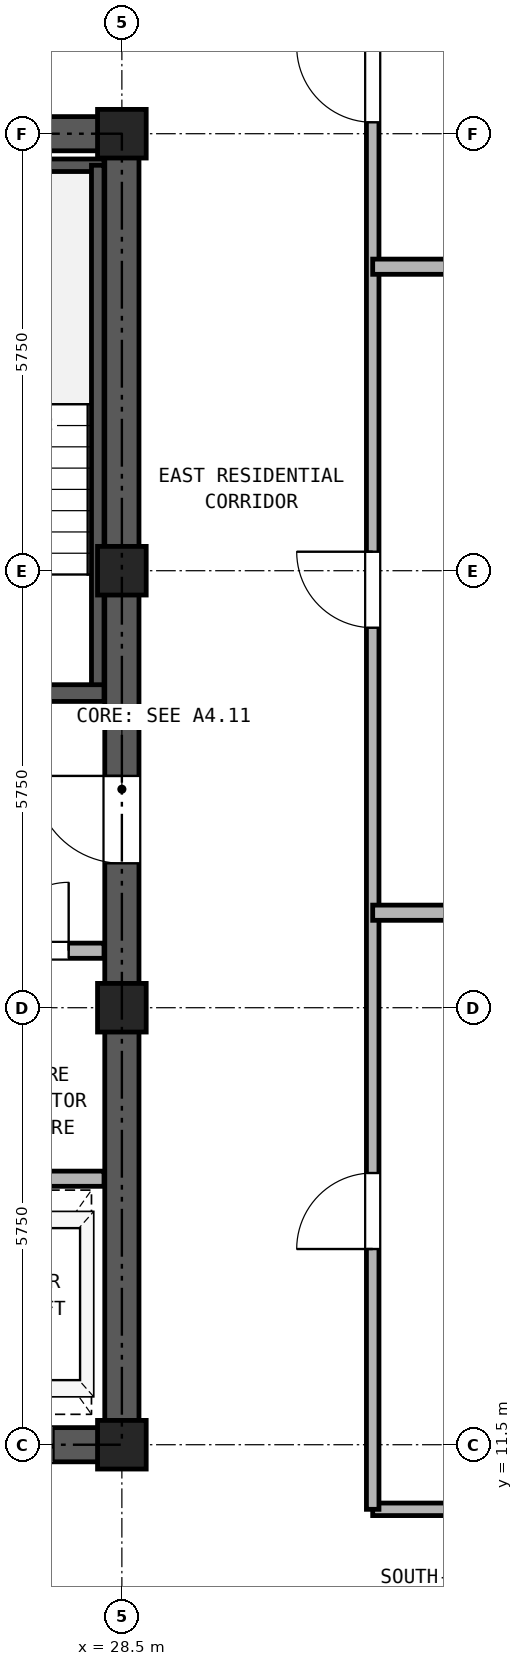
"""IFC4 building model, lengths in metres.
Left out: names, types, materials, properties, quantities, classifications, styles, units other than length and angle.
Written with IfcOpenShell. Run it as: python <this file> out.ifc"""

import sys

from ifc_helpers import new_model, si_unit, direction, frame, frame_2d, origin, origin_2d, place, context, subcontext, project, spatial, rectangle, hollow_rectangle, extrude, source, transform, mapped, element, fill, save


model = new_model("IFC4")
c1 = context("Model", 3, precision=1e-05, world=origin(), true_north=direction((0.0, 1.0)))
c2 = subcontext(c1, "Body", "Model", "MODEL_VIEW")
j1 = project(units=[si_unit("LENGTHUNIT", "METRE"), si_unit("PLANEANGLEUNIT", "RADIAN")], contexts=[c1])
p1 = place(None, origin())
s1 = spatial("IfcSite", under=j1, at=p1, CompositionType="ELEMENT")
p2 = place(p1, origin())
s2 = spatial("IfcBuilding", under=s1, at=p2, CompositionType="ELEMENT")
p3 = place(p2, frame((0.0, 0.0, 162.5)))
s3 = spatial("IfcBuildingStorey", under=s2, at=p3, CompositionType="ELEMENT", Elevation=162.5)
m1 = source(origin(), c2, "Body", "SweptSolid", [
    extrude(hollow_rectangle(XDim=0.64, YDim=0.64, WallThickness=0.035, at=origin_2d()), origin(), (0.0, 0.0, 1.0), 2.95),
])
for number, where, z_axis, x_axis in (
    (1, (28.5, 11.5, 0.0), (0.0, 0.0, 1.0), (1.0, 0.0, 0.0)),
    (2, (28.5, 17.25, 0.0), (0.0, 0.0, 1.0), (1.0, 0.0, 0.0)),
    (3, (28.5, 23.0, 0.0), (0.0, 0.0, 1.0), (1.0, 0.0, 0.0)),
    (4, (28.5, 28.75, 0.0), (0.0, 0.0, 1.0), (1.0, 0.0, 0.0)),
):
    element("IfcColumn", number, at=place(p3, frame(where, z_axis=z_axis, x_axis=x_axis)), inside=s3, PredefinedType="COLUMN", context=c2, shape_type="MappedRepresentation", body=[
        mapped(m1, transform((0.0, 0.0, 0.0), x_axis=(1.0, 0.0, 0.0), y_axis=(0.0, 1.0, 0.0), z_axis=(0.0, 0.0, 1.0), scale=1.0)),
    ])
p4 = place(p3, frame((18.275, 11.5, 0.0), z_axis=(0.0, 0.0, 1.0), x_axis=(1.0, 0.0, 0.0)))
e5 = element("IfcWall", 5, at=p4, inside=s3, PredefinedType="SHEAR", context=c2, shape_type="SweptSolid", body=[
    extrude(rectangle(XDim=10.45, YDim=0.45, at=frame_2d((5.225, 0.0))), origin(), (0.0, 0.0, 1.0), 2.95),
])
p5 = place(p4, frame((1.825, 0.0, 0.0)))
e6 = element("IfcOpeningElement", 6, at=p5, cuts=e5, PredefinedType="OPENING", context=c2, shape_type="SweptSolid", body=[
    extrude(rectangle(XDim=0.95, YDim=2.15, at=frame_2d((0.475, 1.075))), frame((0.0, 0.235, 0.0), z_axis=(0.0, -1.0, 0.0), x_axis=(1.0, 0.0, 0.0)), (0.0, 0.0, 1.0), 0.47),
])
p6 = place(p4, frame((5.325, 0.0, 0.0)))
e7 = element("IfcOpeningElement", 7, at=p6, cuts=e5, PredefinedType="OPENING", context=c2, shape_type="SweptSolid", body=[
    extrude(rectangle(XDim=0.95, YDim=2.15, at=frame_2d((0.475, 1.075))), frame((0.0, 0.235, 0.0), z_axis=(0.0, -1.0, 0.0), x_axis=(1.0, 0.0, 0.0)), (0.0, 0.0, 1.0), 0.47),
])
p7 = place(p4, frame((8.225, 0.0, 0.0)))
e8 = element("IfcOpeningElement", 8, at=p7, cuts=e5, PredefinedType="OPENING", context=c2, shape_type="SweptSolid", body=[
    extrude(rectangle(XDim=1.1, YDim=2.25, at=frame_2d((0.55, 1.125))), frame((0.0, 0.235, 0.0), z_axis=(0.0, -1.0, 0.0), x_axis=(1.0, 0.0, 0.0)), (0.0, 0.0, 1.0), 0.47),
])
p8 = place(p3, frame((18.275, 28.75, 0.0), z_axis=(0.0, 0.0, 1.0), x_axis=(1.0, 0.0, 0.0)))
e9 = element("IfcWall", 9, at=p8, inside=s3, PredefinedType="SHEAR", context=c2, shape_type="SweptSolid", body=[
    extrude(rectangle(XDim=10.45, YDim=0.45, at=frame_2d((5.225, 0.0))), origin(), (0.0, 0.0, 1.0), 2.95),
])
p9 = place(p8, frame((4.105, 0.0, 0.0)))
e10 = element("IfcOpeningElement", 10, at=p9, cuts=e9, PredefinedType="OPENING", context=c2, shape_type="SweptSolid", body=[
    extrude(rectangle(XDim=0.9, YDim=2.05, at=frame_2d((0.45, 1.025))), frame((0.0, 0.235, 0.0), z_axis=(0.0, -1.0, 0.0), x_axis=(1.0, 0.0, 0.0)), (0.0, 0.0, 1.0), 0.47),
])
p10 = place(p8, frame((5.645, 0.0, 0.0)))
e11 = element("IfcOpeningElement", 11, at=p10, cuts=e9, PredefinedType="OPENING", context=c2, shape_type="SweptSolid", body=[
    extrude(rectangle(XDim=0.9, YDim=2.05, at=frame_2d((0.45, 1.025))), frame((0.0, 0.235, 0.0), z_axis=(0.0, -1.0, 0.0), x_axis=(1.0, 0.0, 0.0)), (0.0, 0.0, 1.0), 0.47),
])
p11 = place(p3, frame((28.5, 11.725, 0.0), z_axis=(0.0, 0.0, 1.0), x_axis=(0.0, 1.0, 0.0)))
e12 = element("IfcWall", 12, at=p11, inside=s3, PredefinedType="SHEAR", context=c2, shape_type="SweptSolid", body=[
    extrude(rectangle(XDim=16.8, YDim=0.45, at=frame_2d((8.4, 0.0))), origin(), (0.0, 0.0, 1.0), 2.95),
])
p12 = place(p11, frame((7.425, 0.0, 0.0)))
e13 = element("IfcOpeningElement", 13, at=p12, cuts=e12, PredefinedType="OPENING", context=c2, shape_type="SweptSolid", body=[
    extrude(rectangle(XDim=1.15, YDim=2.2, at=frame_2d((0.575, 1.1))), frame((0.0, 0.235, 0.0), z_axis=(0.0, -1.0, 0.0), x_axis=(1.0, 0.0, 0.0)), (0.0, 0.0, 1.0), 0.47),
])
p13 = place(p3, frame((25.13, 28.335, 0.0), z_axis=(0.0, 0.0, 1.0), x_axis=(1.0, 0.0, 0.0)))
e14 = element("IfcWall", 14, at=p13, inside=s3, PredefinedType="PARTITIONING", context=c2, shape_type="SweptSolid", body=[
    extrude(rectangle(XDim=3.135, YDim=0.165, at=frame_2d((1.567, 0.0))), origin(), (0.0, 0.0, 1.0), 2.95),
])
p14 = place(p3, frame((28.183, 21.39, 0.0), z_axis=(0.0, 0.0, 1.0), x_axis=(0.0, 1.0, 0.0)))
e15 = element("IfcWall", 15, at=p14, inside=s3, PredefinedType="PARTITIONING", context=c2, shape_type="SweptSolid", body=[
    extrude(rectangle(XDim=6.945, YDim=0.165, at=frame_2d((3.473, 0.0))), origin(), (0.0, 0.0, 1.0), 2.95),
])
p15 = place(p3, frame((25.13, 21.39, 0.0), z_axis=(0.0, 0.0, 1.0), x_axis=(1.0, 0.0, 0.0)))
e16 = element("IfcWall", 16, at=p15, inside=s3, PredefinedType="SOLIDWALL", context=c2, shape_type="SweptSolid", body=[
    extrude(rectangle(XDim=3.135, YDim=0.22, at=frame_2d((1.567, 0.0))), origin(), (0.0, 0.0, 1.0), 2.95),
])
p16 = place(p15, frame((0.92, 0.0, 0.0)))
e17 = element("IfcOpeningElement", 17, at=p16, cuts=e16, PredefinedType="OPENING", context=c2, shape_type="SweptSolid", body=[
    extrude(rectangle(XDim=1.15, YDim=2.2, at=frame_2d((0.575, 1.1))), frame((0.0, 0.12, 0.0), z_axis=(0.0, -1.0, 0.0), x_axis=(1.0, 0.0, 0.0)), (0.0, 0.0, 1.0), 0.24),
])
p17 = place(p3, frame((18.735, 18.0, 0.0), z_axis=(0.0, 0.0, 1.0), x_axis=(1.0, 0.0, 0.0)))
e18 = element("IfcWall", 18, at=p17, inside=s3, PredefinedType="PARTITIONING", context=c2, shape_type="SweptSolid", body=[
    extrude(rectangle(XDim=9.53, YDim=0.2, at=frame_2d((4.765, 0.0))), origin(), (0.0, 0.0, 1.0), 2.95),
])
p18 = place(p17, frame((0.515, 0.0, 0.0)))
e19 = element("IfcOpeningElement", 19, at=p18, cuts=e18, PredefinedType="OPENING", context=c2, shape_type="SweptSolid", body=[
    extrude(rectangle(XDim=1.3, YDim=2.3, at=frame_2d((0.65, 1.15))), frame((0.0, 0.11, 0.0), z_axis=(0.0, -1.0, 0.0), x_axis=(1.0, 0.0, 0.0)), (0.0, 0.0, 1.0), 0.22),
])
p19 = place(p17, frame((2.615, 0.0, 0.0)))
e20 = element("IfcOpeningElement", 20, at=p19, cuts=e18, PredefinedType="OPENING", context=c2, shape_type="SweptSolid", body=[
    extrude(rectangle(XDim=1.3, YDim=2.3, at=frame_2d((0.65, 1.15))), frame((0.0, 0.11, 0.0), z_axis=(0.0, -1.0, 0.0), x_axis=(1.0, 0.0, 0.0)), (0.0, 0.0, 1.0), 0.22),
])
p20 = place(p17, frame((5.035, 0.0, 0.0)))
e21 = element("IfcOpeningElement", 21, at=p20, cuts=e18, PredefinedType="OPENING", context=c2, shape_type="SweptSolid", body=[
    extrude(rectangle(XDim=0.9, YDim=2.05, at=frame_2d((0.45, 1.025))), frame((0.0, 0.11, 0.0), z_axis=(0.0, -1.0, 0.0), x_axis=(1.0, 0.0, 0.0)), (0.0, 0.0, 1.0), 0.22),
])
p21 = place(p17, frame((8.165, 0.0, 0.0)))
e22 = element("IfcOpeningElement", 22, at=p21, cuts=e18, PredefinedType="OPENING", context=c2, shape_type="SweptSolid", body=[
    extrude(rectangle(XDim=0.9, YDim=2.05, at=frame_2d((0.45, 1.025))), frame((0.0, 0.11, 0.0), z_axis=(0.0, -1.0, 0.0), x_axis=(1.0, 0.0, 0.0)), (0.0, 0.0, 1.0), 0.22),
])
p22 = place(p3, frame((18.735, 15.0, 0.0), z_axis=(0.0, 0.0, 1.0), x_axis=(1.0, 0.0, 0.0)))
e23 = element("IfcWall", 23, at=p22, inside=s3, PredefinedType="PARTITIONING", context=c2, shape_type="SweptSolid", body=[
    extrude(rectangle(XDim=9.53, YDim=0.2, at=frame_2d((4.765, 0.0))), origin(), (0.0, 0.0, 1.0), 2.95),
])
p23 = place(p3, frame((31.8, 10.65, 0.0), z_axis=(0.0, 0.0, 1.0), x_axis=(1.0, 0.0, 0.0)))
e24 = element("IfcWall", 24, at=p23, inside=s3, PredefinedType="PARTITIONING", context=c2, shape_type="SweptSolid", body=[
    extrude(rectangle(XDim=6.4, YDim=0.165, at=frame_2d((3.2, 0.0))), origin(), (0.0, 0.0, 1.0), 2.95),
])
p24 = place(p3, frame((31.8, 10.65, 0.0), z_axis=(0.0, 0.0, 1.0), x_axis=(0.0, 1.0, 0.0)))
e25 = element("IfcWall", 25, at=p24, inside=s3, PredefinedType="PARTITIONING", context=c2, shape_type="SweptSolid", body=[
    extrude(rectangle(XDim=24.49, YDim=0.165, at=frame_2d((12.245, 0.0))), origin(), (0.0, 0.0, 1.0), 2.95),
])
p25 = place(p24, frame((3.425, 0.0, 0.0)))
e26 = element("IfcOpeningElement", 26, at=p25, cuts=e25, PredefinedType="OPENING", context=c2, shape_type="SweptSolid", body=[
    extrude(rectangle(XDim=1.0, YDim=2.15, at=frame_2d((0.5, 1.075))), frame((0.0, 0.093, 0.0), z_axis=(0.0, -1.0, 0.0), x_axis=(1.0, 0.0, 0.0)), (0.0, 0.0, 1.0), 0.185),
])
p26 = place(p24, frame((11.6, 0.0, 0.0)))
e27 = element("IfcOpeningElement", 27, at=p26, cuts=e25, PredefinedType="OPENING", context=c2, shape_type="SweptSolid", body=[
    extrude(rectangle(XDim=1.0, YDim=2.15, at=frame_2d((0.5, 1.075))), frame((0.0, 0.093, 0.0), z_axis=(0.0, -1.0, 0.0), x_axis=(1.0, 0.0, 0.0)), (0.0, 0.0, 1.0), 0.185),
])
p27 = place(p24, frame((18.25, 0.0, 0.0)))
e28 = element("IfcOpeningElement", 28, at=p27, cuts=e25, PredefinedType="OPENING", context=c2, shape_type="SweptSolid", body=[
    extrude(rectangle(XDim=1.0, YDim=2.15, at=frame_2d((0.5, 1.075))), frame((0.0, 0.093, 0.0), z_axis=(0.0, -1.0, 0.0), x_axis=(1.0, 0.0, 0.0)), (0.0, 0.0, 1.0), 0.185),
])
for number, where, z_axis, x_axis in (
    (29, (31.8, 18.5, 0.0), (0.0, 0.0, 1.0), (1.0, 0.0, 0.0)),
    (30, (31.8, 27.0, 0.0), (0.0, 0.0, 1.0), (1.0, 0.0, 0.0)),
):
    element("IfcWall", number, at=place(p3, frame(where, z_axis=z_axis, x_axis=x_axis)), inside=s3, PredefinedType="PARTITIONING", context=c2, shape_type="SweptSolid", body=[
        extrude(rectangle(XDim=9.84, YDim=0.2, at=frame_2d((4.92, 0.0))), origin(), (0.0, 0.0, 1.0), 2.95),
    ])
p28 = place(p21, frame((0.9, 0.0, 0.0), z_axis=(0.0, 0.0, 1.0), x_axis=(-1.0, 0.0, 0.0)))
e31 = element("IfcDoor", 31, at=p28, inside=s3, OperationType="SINGLE_SWING_RIGHT", PredefinedType="DOOR", context=c2, shape_type="SweptSolid", body=[
    extrude(rectangle(XDim=0.9, YDim=2.05, at=frame_2d((0.45, 1.025))), frame((0.0, 0.025, 0.0), z_axis=(0.0, -1.0, 0.0), x_axis=(1.0, 0.0, 0.0)), (0.0, 0.0, 1.0), 0.05),
])
fill(e22, e31)
p29 = place(p12, origin())
e32 = element("IfcDoor", 32, at=p29, inside=s3, OperationType="SINGLE_SWING_RIGHT", PredefinedType="DOOR", context=c2, shape_type="SweptSolid", body=[
    extrude(rectangle(XDim=1.15, YDim=2.2, at=frame_2d((0.575, 1.1))), frame((0.0, 0.025, 0.0), z_axis=(0.0, -1.0, 0.0), x_axis=(1.0, 0.0, 0.0)), (0.0, 0.0, 1.0), 0.05),
])
fill(e13, e32)
p30 = place(p7, frame((1.1, 0.0, 0.0), z_axis=(0.0, 0.0, 1.0), x_axis=(-1.0, 0.0, 0.0)))
e33 = element("IfcDoor", 33, at=p30, inside=s3, OperationType="DOUBLE_DOOR_SLIDING", PredefinedType="DOOR", context=c2, shape_type="SweptSolid", body=[
    extrude(rectangle(XDim=1.1, YDim=2.25, at=frame_2d((0.55, 1.125))), frame((0.0, 0.025, 0.0), z_axis=(0.0, -1.0, 0.0), x_axis=(1.0, 0.0, 0.0)), (0.0, 0.0, 1.0), 0.05),
])
fill(e8, e33)
p31 = place(p25, frame((1.0, 0.0, 0.0), z_axis=(0.0, 0.0, 1.0), x_axis=(-1.0, 0.0, 0.0)))
e34 = element("IfcDoor", 34, at=p31, inside=s3, OperationType="SINGLE_SWING_LEFT", PredefinedType="DOOR", context=c2, shape_type="SweptSolid", body=[
    extrude(rectangle(XDim=1.0, YDim=2.15, at=frame_2d((0.5, 1.075))), frame((0.0, 0.025, 0.0), z_axis=(0.0, -1.0, 0.0), x_axis=(1.0, 0.0, 0.0)), (0.0, 0.0, 1.0), 0.05),
])
fill(e26, e34)
p32 = place(p26, frame((1.0, 0.0, 0.0), z_axis=(0.0, 0.0, 1.0), x_axis=(-1.0, 0.0, 0.0)))
e35 = element("IfcDoor", 35, at=p32, inside=s3, OperationType="SINGLE_SWING_RIGHT", PredefinedType="DOOR", context=c2, shape_type="SweptSolid", body=[
    extrude(rectangle(XDim=1.0, YDim=2.15, at=frame_2d((0.5, 1.075))), frame((0.0, 0.025, 0.0), z_axis=(0.0, -1.0, 0.0), x_axis=(1.0, 0.0, 0.0)), (0.0, 0.0, 1.0), 0.05),
])
fill(e27, e35)
p33 = place(p27, frame((1.0, 0.0, 0.0), z_axis=(0.0, 0.0, 1.0), x_axis=(-1.0, 0.0, 0.0)))
e36 = element("IfcDoor", 36, at=p33, inside=s3, OperationType="SINGLE_SWING_RIGHT", PredefinedType="DOOR", context=c2, shape_type="SweptSolid", body=[
    extrude(rectangle(XDim=1.0, YDim=2.15, at=frame_2d((0.5, 1.075))), frame((0.0, 0.025, 0.0), z_axis=(0.0, -1.0, 0.0), x_axis=(1.0, 0.0, 0.0)), (0.0, 0.0, 1.0), 0.05),
])
fill(e28, e36)
save(model, sys.argv[1])
